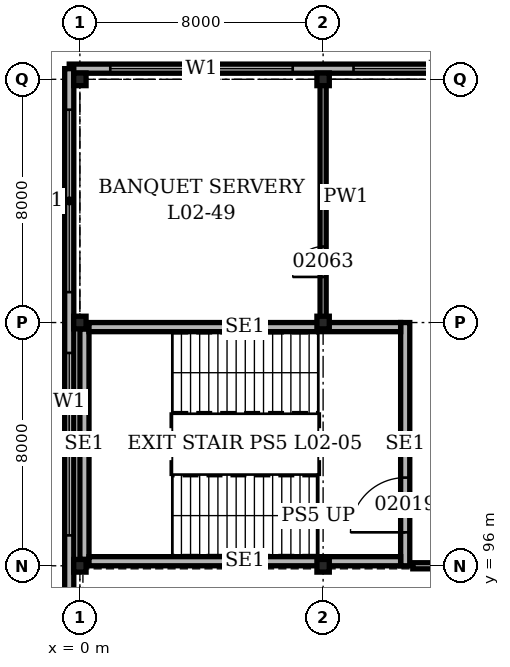
"""IFC4 building model, lengths in metres.
Left out: names, types, materials, properties, quantities, classifications, styles, units other than length and angle.
Written with IfcOpenShell. Run it as: python <this file> out.ifc"""

import sys

from ifc_helpers import new_model, si_unit, direction, frame, frame_2d, origin, origin_2d, place, context, subcontext, project, spatial, rectangle, i_section, extrude, element, fill, save


model = new_model("IFC4")
c1 = context("Model", 3, precision=1e-05, world=origin(), true_north=direction((0.0, 1.0)))
c2 = subcontext(c1, "Body", "Model", "MODEL_VIEW")
j1 = project(units=[si_unit("LENGTHUNIT", "METRE"), si_unit("PLANEANGLEUNIT", "RADIAN")], contexts=[c1])
p1 = place(None, origin())
s1 = spatial("IfcSite", under=j1, at=p1, CompositionType="ELEMENT")
p2 = place(p1, origin())
s2 = spatial("IfcBuilding", under=s1, at=p2, CompositionType="ELEMENT")
p3 = place(p2, frame((0.0, 0.0, 9.9)))
s3 = spatial("IfcBuildingStorey", under=s2, at=p3, CompositionType="ELEMENT", Elevation=9.9)
for number, where, z_axis, x_axis in (
    (1, (0.0, 96.0, 0.0), (0.0, 0.0, 1.0), (1.0, 0.0, 0.0)),
    (2, (0.0, 104.0, 0.0), (0.0, 0.0, 1.0), (1.0, 0.0, 0.0)),
    (3, (0.0, 112.0, 0.0), (0.0, 0.0, 1.0), (1.0, 0.0, 0.0)),
    (4, (8.0, 96.0, 0.0), (0.0, 0.0, 1.0), (1.0, 0.0, 0.0)),
    (5, (8.0, 104.0, 0.0), (0.0, 0.0, 1.0), (1.0, 0.0, 0.0)),
    (6, (8.0, 112.0, 0.0), (0.0, 0.0, 1.0), (1.0, 0.0, 0.0)),
):
    element("IfcColumn", number, at=place(p3, frame(where, z_axis=z_axis, x_axis=x_axis)), inside=s3, PredefinedType="COLUMN", context=c2, shape_type="SweptSolid", body=[
        extrude(i_section(OverallWidth=0.406, OverallDepth=0.417, WebThickness=0.03, FlangeThickness=0.048, at=origin_2d()), origin(), (0.0, 0.0, 1.0), 5.0),
    ])
p4 = place(p3, frame((112.35, 112.35, 0.0), z_axis=(0.0, 0.0, 1.0), x_axis=(-1.0, 0.0, 0.0)))
e7 = element("IfcWall", 7, at=p4, inside=s3, PredefinedType="SOLIDWALL", context=c2, shape_type="SweptSolid", body=[
    extrude(rectangle(XDim=112.7, YDim=0.3, at=frame_2d((56.35, 0.0))), origin(), (0.0, 0.0, 1.0), 5.0),
])
p5 = place(p4, frame((1.35, 0.0, 1.0)))
e8 = element("IfcOpeningElement", 8, at=p5, cuts=e7, PredefinedType="OPENING", context=c2, shape_type="SweptSolid", body=[
    extrude(rectangle(XDim=6.0, YDim=1.5, at=frame_2d((3.0, 0.75))), frame((0.0, 0.16, 0.0), z_axis=(0.0, -1.0, 0.0), x_axis=(1.0, 0.0, 0.0)), (0.0, 0.0, 1.0), 0.32),
])
p6 = place(p4, frame((9.35, 0.0, 1.0)))
e9 = element("IfcOpeningElement", 9, at=p6, cuts=e7, PredefinedType="OPENING", context=c2, shape_type="SweptSolid", body=[
    extrude(rectangle(XDim=6.0, YDim=1.5, at=frame_2d((3.0, 0.75))), frame((0.0, 0.16, 0.0), z_axis=(0.0, -1.0, 0.0), x_axis=(1.0, 0.0, 0.0)), (0.0, 0.0, 1.0), 0.32),
])
p7 = place(p4, frame((17.35, 0.0, 1.0)))
e10 = element("IfcOpeningElement", 10, at=p7, cuts=e7, PredefinedType="OPENING", context=c2, shape_type="SweptSolid", body=[
    extrude(rectangle(XDim=6.0, YDim=1.5, at=frame_2d((3.0, 0.75))), frame((0.0, 0.16, 0.0), z_axis=(0.0, -1.0, 0.0), x_axis=(1.0, 0.0, 0.0)), (0.0, 0.0, 1.0), 0.32),
])
p8 = place(p4, frame((25.35, 0.0, 1.0)))
e11 = element("IfcOpeningElement", 11, at=p8, cuts=e7, PredefinedType="OPENING", context=c2, shape_type="SweptSolid", body=[
    extrude(rectangle(XDim=6.0, YDim=1.5, at=frame_2d((3.0, 0.75))), frame((0.0, 0.16, 0.0), z_axis=(0.0, -1.0, 0.0), x_axis=(1.0, 0.0, 0.0)), (0.0, 0.0, 1.0), 0.32),
])
p9 = place(p4, frame((33.35, 0.0, 1.0)))
e12 = element("IfcOpeningElement", 12, at=p9, cuts=e7, PredefinedType="OPENING", context=c2, shape_type="SweptSolid", body=[
    extrude(rectangle(XDim=6.0, YDim=1.5, at=frame_2d((3.0, 0.75))), frame((0.0, 0.16, 0.0), z_axis=(0.0, -1.0, 0.0), x_axis=(1.0, 0.0, 0.0)), (0.0, 0.0, 1.0), 0.32),
])
p10 = place(p4, frame((41.35, 0.0, 1.0)))
e13 = element("IfcOpeningElement", 13, at=p10, cuts=e7, PredefinedType="OPENING", context=c2, shape_type="SweptSolid", body=[
    extrude(rectangle(XDim=6.0, YDim=1.5, at=frame_2d((3.0, 0.75))), frame((0.0, 0.16, 0.0), z_axis=(0.0, -1.0, 0.0), x_axis=(1.0, 0.0, 0.0)), (0.0, 0.0, 1.0), 0.32),
])
p11 = place(p4, frame((49.35, 0.0, 1.0)))
e14 = element("IfcOpeningElement", 14, at=p11, cuts=e7, PredefinedType="OPENING", context=c2, shape_type="SweptSolid", body=[
    extrude(rectangle(XDim=6.0, YDim=1.5, at=frame_2d((3.0, 0.75))), frame((0.0, 0.16, 0.0), z_axis=(0.0, -1.0, 0.0), x_axis=(1.0, 0.0, 0.0)), (0.0, 0.0, 1.0), 0.32),
])
p12 = place(p4, frame((57.35, 0.0, 1.0)))
e15 = element("IfcOpeningElement", 15, at=p12, cuts=e7, PredefinedType="OPENING", context=c2, shape_type="SweptSolid", body=[
    extrude(rectangle(XDim=6.0, YDim=1.5, at=frame_2d((3.0, 0.75))), frame((0.0, 0.16, 0.0), z_axis=(0.0, -1.0, 0.0), x_axis=(1.0, 0.0, 0.0)), (0.0, 0.0, 1.0), 0.32),
])
p13 = place(p4, frame((65.35, 0.0, 1.0)))
e16 = element("IfcOpeningElement", 16, at=p13, cuts=e7, PredefinedType="OPENING", context=c2, shape_type="SweptSolid", body=[
    extrude(rectangle(XDim=6.0, YDim=1.5, at=frame_2d((3.0, 0.75))), frame((0.0, 0.16, 0.0), z_axis=(0.0, -1.0, 0.0), x_axis=(1.0, 0.0, 0.0)), (0.0, 0.0, 1.0), 0.32),
])
p14 = place(p4, frame((73.35, 0.0, 1.0)))
e17 = element("IfcOpeningElement", 17, at=p14, cuts=e7, PredefinedType="OPENING", context=c2, shape_type="SweptSolid", body=[
    extrude(rectangle(XDim=6.0, YDim=1.5, at=frame_2d((3.0, 0.75))), frame((0.0, 0.16, 0.0), z_axis=(0.0, -1.0, 0.0), x_axis=(1.0, 0.0, 0.0)), (0.0, 0.0, 1.0), 0.32),
])
p15 = place(p4, frame((81.35, 0.0, 1.0)))
e18 = element("IfcOpeningElement", 18, at=p15, cuts=e7, PredefinedType="OPENING", context=c2, shape_type="SweptSolid", body=[
    extrude(rectangle(XDim=6.0, YDim=1.5, at=frame_2d((3.0, 0.75))), frame((0.0, 0.16, 0.0), z_axis=(0.0, -1.0, 0.0), x_axis=(1.0, 0.0, 0.0)), (0.0, 0.0, 1.0), 0.32),
])
p16 = place(p4, frame((89.35, 0.0, 1.0)))
e19 = element("IfcOpeningElement", 19, at=p16, cuts=e7, PredefinedType="OPENING", context=c2, shape_type="SweptSolid", body=[
    extrude(rectangle(XDim=6.0, YDim=1.5, at=frame_2d((3.0, 0.75))), frame((0.0, 0.16, 0.0), z_axis=(0.0, -1.0, 0.0), x_axis=(1.0, 0.0, 0.0)), (0.0, 0.0, 1.0), 0.32),
])
p17 = place(p4, frame((97.35, 0.0, 1.0)))
e20 = element("IfcOpeningElement", 20, at=p17, cuts=e7, PredefinedType="OPENING", context=c2, shape_type="SweptSolid", body=[
    extrude(rectangle(XDim=6.0, YDim=1.5, at=frame_2d((3.0, 0.75))), frame((0.0, 0.16, 0.0), z_axis=(0.0, -1.0, 0.0), x_axis=(1.0, 0.0, 0.0)), (0.0, 0.0, 1.0), 0.32),
])
p18 = place(p4, frame((105.35, 0.0, 1.0)))
e21 = element("IfcOpeningElement", 21, at=p18, cuts=e7, PredefinedType="OPENING", context=c2, shape_type="SweptSolid", body=[
    extrude(rectangle(XDim=6.0, YDim=1.5, at=frame_2d((3.0, 0.75))), frame((0.0, 0.16, 0.0), z_axis=(0.0, -1.0, 0.0), x_axis=(1.0, 0.0, 0.0)), (0.0, 0.0, 1.0), 0.32),
])
p19 = place(p3, frame((-0.35, 112.35, 0.0), z_axis=(0.0, 0.0, 1.0), x_axis=(0.0, -1.0, 0.0)))
e22 = element("IfcWall", 22, at=p19, inside=s3, PredefinedType="SOLIDWALL", context=c2, shape_type="SweptSolid", body=[
    extrude(rectangle(XDim=112.7, YDim=0.3, at=frame_2d((56.35, 0.0))), origin(), (0.0, 0.0, 1.0), 5.0),
])
p20 = place(p19, frame((1.35, 0.0, 1.0)))
e23 = element("IfcOpeningElement", 23, at=p20, cuts=e22, PredefinedType="OPENING", context=c2, shape_type="SweptSolid", body=[
    extrude(rectangle(XDim=6.0, YDim=1.5, at=frame_2d((3.0, 0.75))), frame((0.0, 0.16, 0.0), z_axis=(0.0, -1.0, 0.0), x_axis=(1.0, 0.0, 0.0)), (0.0, 0.0, 1.0), 0.32),
])
p21 = place(p19, frame((9.35, 0.0, 1.0)))
e24 = element("IfcOpeningElement", 24, at=p21, cuts=e22, PredefinedType="OPENING", context=c2, shape_type="SweptSolid", body=[
    extrude(rectangle(XDim=6.0, YDim=1.5, at=frame_2d((3.0, 0.75))), frame((0.0, 0.16, 0.0), z_axis=(0.0, -1.0, 0.0), x_axis=(1.0, 0.0, 0.0)), (0.0, 0.0, 1.0), 0.32),
])
p22 = place(p19, frame((17.35, 0.0, 1.0)))
e25 = element("IfcOpeningElement", 25, at=p22, cuts=e22, PredefinedType="OPENING", context=c2, shape_type="SweptSolid", body=[
    extrude(rectangle(XDim=6.0, YDim=1.5, at=frame_2d((3.0, 0.75))), frame((0.0, 0.16, 0.0), z_axis=(0.0, -1.0, 0.0), x_axis=(1.0, 0.0, 0.0)), (0.0, 0.0, 1.0), 0.32),
])
p23 = place(p19, frame((25.35, 0.0, 1.0)))
e26 = element("IfcOpeningElement", 26, at=p23, cuts=e22, PredefinedType="OPENING", context=c2, shape_type="SweptSolid", body=[
    extrude(rectangle(XDim=6.0, YDim=1.5, at=frame_2d((3.0, 0.75))), frame((0.0, 0.16, 0.0), z_axis=(0.0, -1.0, 0.0), x_axis=(1.0, 0.0, 0.0)), (0.0, 0.0, 1.0), 0.32),
])
p24 = place(p19, frame((33.35, 0.0, 1.0)))
e27 = element("IfcOpeningElement", 27, at=p24, cuts=e22, PredefinedType="OPENING", context=c2, shape_type="SweptSolid", body=[
    extrude(rectangle(XDim=6.0, YDim=1.5, at=frame_2d((3.0, 0.75))), frame((0.0, 0.16, 0.0), z_axis=(0.0, -1.0, 0.0), x_axis=(1.0, 0.0, 0.0)), (0.0, 0.0, 1.0), 0.32),
])
p25 = place(p19, frame((41.35, 0.0, 1.0)))
e28 = element("IfcOpeningElement", 28, at=p25, cuts=e22, PredefinedType="OPENING", context=c2, shape_type="SweptSolid", body=[
    extrude(rectangle(XDim=6.0, YDim=1.5, at=frame_2d((3.0, 0.75))), frame((0.0, 0.16, 0.0), z_axis=(0.0, -1.0, 0.0), x_axis=(1.0, 0.0, 0.0)), (0.0, 0.0, 1.0), 0.32),
])
p26 = place(p19, frame((49.35, 0.0, 1.0)))
e29 = element("IfcOpeningElement", 29, at=p26, cuts=e22, PredefinedType="OPENING", context=c2, shape_type="SweptSolid", body=[
    extrude(rectangle(XDim=6.0, YDim=1.5, at=frame_2d((3.0, 0.75))), frame((0.0, 0.16, 0.0), z_axis=(0.0, -1.0, 0.0), x_axis=(1.0, 0.0, 0.0)), (0.0, 0.0, 1.0), 0.32),
])
p27 = place(p19, frame((57.35, 0.0, 1.0)))
e30 = element("IfcOpeningElement", 30, at=p27, cuts=e22, PredefinedType="OPENING", context=c2, shape_type="SweptSolid", body=[
    extrude(rectangle(XDim=6.0, YDim=1.5, at=frame_2d((3.0, 0.75))), frame((0.0, 0.16, 0.0), z_axis=(0.0, -1.0, 0.0), x_axis=(1.0, 0.0, 0.0)), (0.0, 0.0, 1.0), 0.32),
])
p28 = place(p19, frame((65.35, 0.0, 1.0)))
e31 = element("IfcOpeningElement", 31, at=p28, cuts=e22, PredefinedType="OPENING", context=c2, shape_type="SweptSolid", body=[
    extrude(rectangle(XDim=6.0, YDim=1.5, at=frame_2d((3.0, 0.75))), frame((0.0, 0.16, 0.0), z_axis=(0.0, -1.0, 0.0), x_axis=(1.0, 0.0, 0.0)), (0.0, 0.0, 1.0), 0.32),
])
p29 = place(p19, frame((73.35, 0.0, 1.0)))
e32 = element("IfcOpeningElement", 32, at=p29, cuts=e22, PredefinedType="OPENING", context=c2, shape_type="SweptSolid", body=[
    extrude(rectangle(XDim=6.0, YDim=1.5, at=frame_2d((3.0, 0.75))), frame((0.0, 0.16, 0.0), z_axis=(0.0, -1.0, 0.0), x_axis=(1.0, 0.0, 0.0)), (0.0, 0.0, 1.0), 0.32),
])
p30 = place(p19, frame((81.35, 0.0, 1.0)))
e33 = element("IfcOpeningElement", 33, at=p30, cuts=e22, PredefinedType="OPENING", context=c2, shape_type="SweptSolid", body=[
    extrude(rectangle(XDim=6.0, YDim=1.5, at=frame_2d((3.0, 0.75))), frame((0.0, 0.16, 0.0), z_axis=(0.0, -1.0, 0.0), x_axis=(1.0, 0.0, 0.0)), (0.0, 0.0, 1.0), 0.32),
])
p31 = place(p19, frame((89.35, 0.0, 1.0)))
e34 = element("IfcOpeningElement", 34, at=p31, cuts=e22, PredefinedType="OPENING", context=c2, shape_type="SweptSolid", body=[
    extrude(rectangle(XDim=6.0, YDim=1.5, at=frame_2d((3.0, 0.75))), frame((0.0, 0.16, 0.0), z_axis=(0.0, -1.0, 0.0), x_axis=(1.0, 0.0, 0.0)), (0.0, 0.0, 1.0), 0.32),
])
p32 = place(p19, frame((97.35, 0.0, 1.0)))
e35 = element("IfcOpeningElement", 35, at=p32, cuts=e22, PredefinedType="OPENING", context=c2, shape_type="SweptSolid", body=[
    extrude(rectangle(XDim=6.0, YDim=1.5, at=frame_2d((3.0, 0.75))), frame((0.0, 0.16, 0.0), z_axis=(0.0, -1.0, 0.0), x_axis=(1.0, 0.0, 0.0)), (0.0, 0.0, 1.0), 0.32),
])
p33 = place(p19, frame((105.35, 0.0, 1.0)))
e36 = element("IfcOpeningElement", 36, at=p33, cuts=e22, PredefinedType="OPENING", context=c2, shape_type="SweptSolid", body=[
    extrude(rectangle(XDim=6.0, YDim=1.5, at=frame_2d((3.0, 0.75))), frame((0.0, 0.16, 0.0), z_axis=(0.0, -1.0, 0.0), x_axis=(1.0, 0.0, 0.0)), (0.0, 0.0, 1.0), 0.32),
])
p34 = place(p3, frame((0.15, 96.208, 0.0), z_axis=(0.0, 0.0, 1.0), x_axis=(0.0, 1.0, 0.0)))
e37 = element("IfcWall", 37, at=p34, inside=s3, PredefinedType="SOLIDWALL", context=c2, shape_type="SweptSolid", body=[
    extrude(rectangle(XDim=7.583, YDim=0.3, at=frame_2d((3.792, 0.0))), origin(), (0.0, 0.0, 1.0), 4.8),
])
p35 = place(p3, frame((10.7, 96.0, 0.0), z_axis=(0.0, 0.0, 1.0), x_axis=(0.0, 1.0, 0.0)))
e38 = element("IfcWall", 38, at=p35, inside=s3, PredefinedType="SOLIDWALL", context=c2, shape_type="SweptSolid", body=[
    extrude(rectangle(XDim=8.0, YDim=0.3, at=frame_2d((4.0, 0.0))), origin(), (0.0, 0.0, 1.0), 4.8),
])
p36 = place(p35, frame((1.1, 0.0, 0.0)))
e39 = element("IfcOpeningElement", 39, at=p36, cuts=e38, PredefinedType="OPENING", context=c2, shape_type="SweptSolid", body=[
    extrude(rectangle(XDim=1.8, YDim=2.1, at=frame_2d((0.9, 1.05))), frame((0.0, 0.16, 0.0), z_axis=(0.0, -1.0, 0.0), x_axis=(1.0, 0.0, 0.0)), (0.0, 0.0, 1.0), 0.32),
])
for number, where, z_axis, x_axis in (
    (40, (0.3, 96.15, 0.0), (0.0, 0.0, 1.0), (1.0, 0.0, 0.0)),
    (41, (0.3, 103.85, 0.0), (0.0, 0.0, 1.0), (1.0, 0.0, 0.0)),
):
    element("IfcWall", number, at=place(p3, frame(where, z_axis=z_axis, x_axis=x_axis)), inside=s3, PredefinedType="SOLIDWALL", context=c2, shape_type="SweptSolid", body=[
        extrude(rectangle(XDim=10.25, YDim=0.3, at=frame_2d((5.125, 0.0))), origin(), (0.0, 0.0, 1.0), 4.8),
    ])
p37 = place(p3, frame((10.95, 96.0, 0.0), z_axis=(0.0, 0.0, 1.0), x_axis=(1.0, 0.0, 0.0)))
e42 = element("IfcWall", 42, at=p37, inside=s3, PredefinedType="PARTITIONING", context=c2, shape_type="SweptSolid", body=[
    extrude(rectangle(XDim=28.95, YDim=0.2, at=frame_2d((14.475, 0.0))), origin(), (0.0, 0.0, 1.0), 4.028),
])
p38 = place(p3, frame((8.0, 104.1, 0.0), z_axis=(0.0, 0.0, 1.0), x_axis=(0.0, 1.0, 0.0)))
e43 = element("IfcWall", 43, at=p38, inside=s3, PredefinedType="PARTITIONING", context=c2, shape_type="SweptSolid", body=[
    extrude(rectangle(XDim=8.05, YDim=0.2, at=frame_2d((4.025, 0.0))), origin(), (0.0, 0.0, 1.0), 4.028),
])
p39 = place(p38, frame((1.4, 0.0, 0.0)))
e44 = element("IfcOpeningElement", 44, at=p39, cuts=e43, PredefinedType="OPENING", context=c2, shape_type="SweptSolid", body=[
    extrude(rectangle(XDim=1.0, YDim=2.1, at=frame_2d((0.5, 1.05))), frame((0.0, 0.11, 0.0), z_axis=(0.0, -1.0, 0.0), x_axis=(1.0, 0.0, 0.0)), (0.0, 0.0, 1.0), 0.22),
])
p40 = place(p17, origin())
e45 = element("IfcWindow", 45, at=p40, inside=s3, PartitioningType="SINGLE_PANEL", PredefinedType="WINDOW", context=c2, shape_type="SweptSolid", body=[
    extrude(rectangle(XDim=6.0, YDim=1.5, at=frame_2d((3.0, 0.75))), frame((0.0, 0.03, 0.0), z_axis=(0.0, -1.0, 0.0), x_axis=(1.0, 0.0, 0.0)), (0.0, 0.0, 1.0), 0.06),
])
fill(e20, e45)
p41 = place(p18, origin())
e46 = element("IfcWindow", 46, at=p41, inside=s3, PartitioningType="SINGLE_PANEL", PredefinedType="WINDOW", context=c2, shape_type="SweptSolid", body=[
    extrude(rectangle(XDim=6.0, YDim=1.5, at=frame_2d((3.0, 0.75))), frame((0.0, 0.03, 0.0), z_axis=(0.0, -1.0, 0.0), x_axis=(1.0, 0.0, 0.0)), (0.0, 0.0, 1.0), 0.06),
])
fill(e21, e46)
p42 = place(p20, origin())
e47 = element("IfcWindow", 47, at=p42, inside=s3, PartitioningType="SINGLE_PANEL", PredefinedType="WINDOW", context=c2, shape_type="SweptSolid", body=[
    extrude(rectangle(XDim=6.0, YDim=1.5, at=frame_2d((3.0, 0.75))), frame((0.0, 0.03, 0.0), z_axis=(0.0, -1.0, 0.0), x_axis=(1.0, 0.0, 0.0)), (0.0, 0.0, 1.0), 0.06),
])
fill(e23, e47)
p43 = place(p21, origin())
e48 = element("IfcWindow", 48, at=p43, inside=s3, PartitioningType="SINGLE_PANEL", PredefinedType="WINDOW", context=c2, shape_type="SweptSolid", body=[
    extrude(rectangle(XDim=6.0, YDim=1.5, at=frame_2d((3.0, 0.75))), frame((0.0, 0.03, 0.0), z_axis=(0.0, -1.0, 0.0), x_axis=(1.0, 0.0, 0.0)), (0.0, 0.0, 1.0), 0.06),
])
fill(e24, e48)
p44 = place(p36, origin())
e49 = element("IfcDoor", 49, at=p44, inside=s3, OperationType="DOUBLE_DOOR_SINGLE_SWING", PredefinedType="DOOR", context=c2, shape_type="SweptSolid", body=[
    extrude(rectangle(XDim=1.8, YDim=2.1, at=frame_2d((0.9, 1.05))), frame((0.0, 0.15, 0.0), z_axis=(0.0, -1.0, 0.0), x_axis=(1.0, 0.0, 0.0)), (0.0, 0.0, 1.0), 0.3),
])
fill(e39, e49)
p45 = place(p39, origin())
e50 = element("IfcDoor", 50, at=p45, inside=s3, OperationType="SINGLE_SWING_LEFT", PredefinedType="DOOR", context=c2, shape_type="SweptSolid", body=[
    extrude(rectangle(XDim=1.0, YDim=2.1, at=frame_2d((0.5, 1.05))), frame((0.0, 0.1, 0.0), z_axis=(0.0, -1.0, 0.0), x_axis=(1.0, 0.0, 0.0)), (0.0, 0.0, 1.0), 0.199),
])
fill(e44, e50)
save(model, sys.argv[1])
